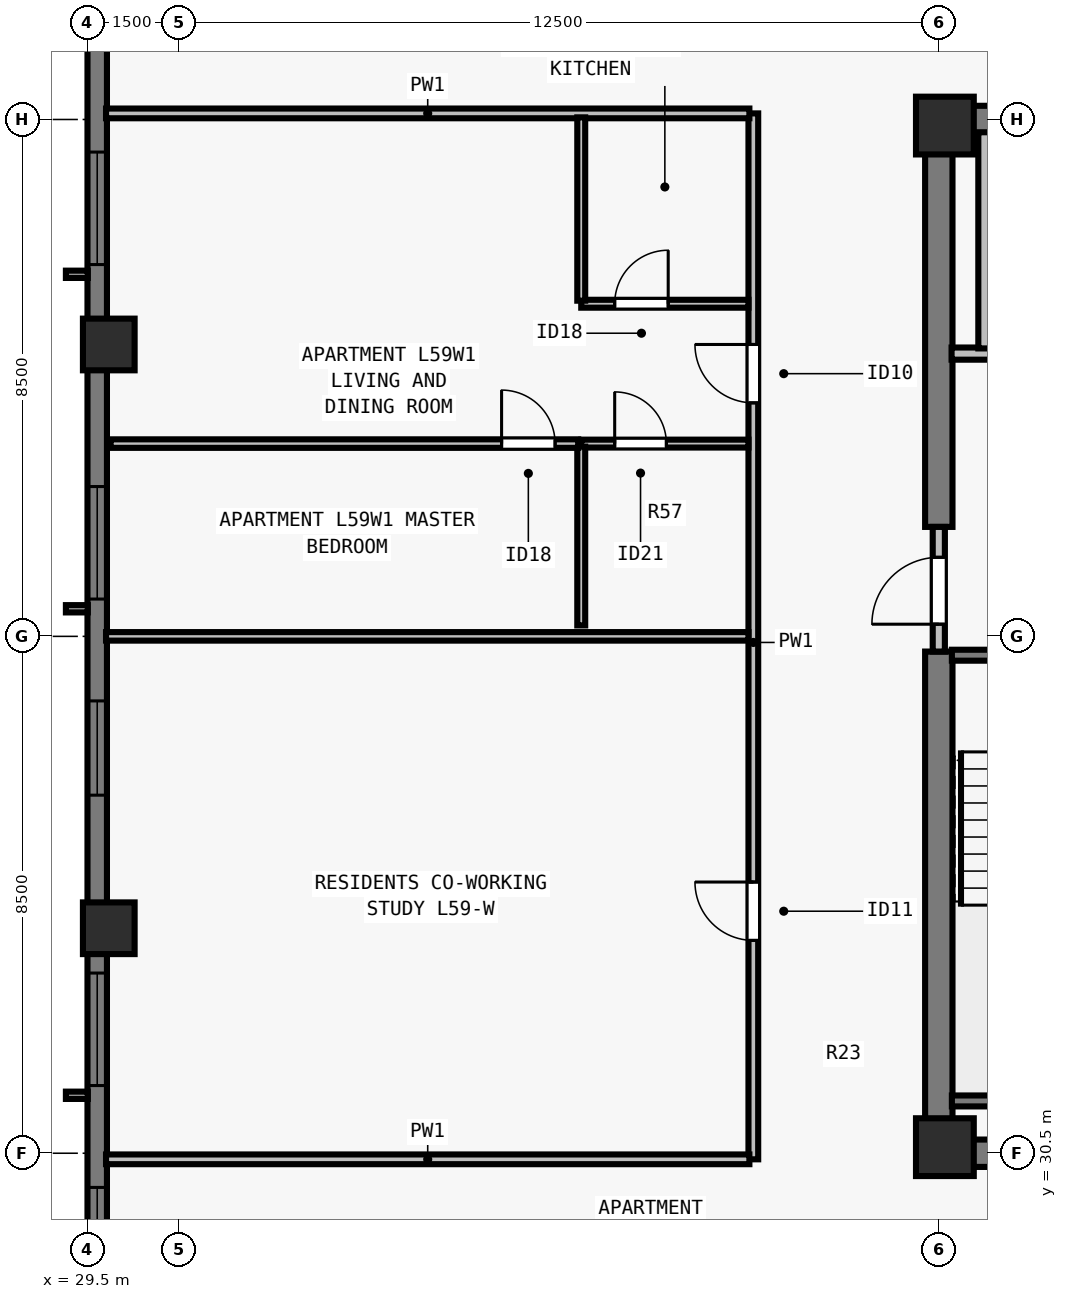
"""IFC4 building model, lengths in metres.
Left out: names, types, materials, properties, quantities, classifications, styles, units other than length and angle.
Written with IfcOpenShell. Run it as: python <this file> out.ifc"""

import sys

from ifc_helpers import new_model, si_unit, direction, frame, frame_2d, origin, origin_2d, place, context, subcontext, project, spatial, rectangle, extrude, element, fill, save


model = new_model("IFC4")
c1 = context("Model", 3, precision=1e-05, world=origin(), true_north=direction((0.0, 1.0)))
c2 = subcontext(c1, "Body", "Model", "MODEL_VIEW")
j1 = project(units=[si_unit("LENGTHUNIT", "METRE"), si_unit("PLANEANGLEUNIT", "RADIAN")], contexts=[c1])
p1 = place(None, origin())
s1 = spatial("IfcSite", under=j1, at=p1, CompositionType="ELEMENT")
p2 = place(p1, origin())
s2 = spatial("IfcBuilding", under=s1, at=p2, CompositionType="ELEMENT")
p3 = place(p2, frame((0.0, 0.0, 216.5)))
s3 = spatial("IfcBuildingStorey", under=s2, at=p3, CompositionType="ELEMENT", Elevation=216.5)
for number, where, z_axis, x_axis in (
    (1, (43.6, 30.6, 0.0), (0.0, 0.0, 1.0), (1.0, 0.0, 0.0)),
    (2, (43.6, 47.4, 0.0), (0.0, 0.0, 1.0), (1.0, 0.0, 0.0)),
):
    element("IfcColumn", number, at=place(p3, frame(where, z_axis=z_axis, x_axis=x_axis)), inside=s3, PredefinedType="COLUMN", context=c2, shape_type="SweptSolid", body=[
        extrude(rectangle(XDim=0.95, YDim=0.95, at=origin_2d()), origin(), (0.0, 0.0, 1.0), 3.5),
    ])
for number, where, z_axis, x_axis in (
    (3, (29.85, 43.8, 0.0), (0.0, 0.0, 1.0), (0.0, 1.0, 0.0)),
    (4, (29.85, 34.2, 0.0), (0.0, 0.0, 1.0), (0.0, 1.0, 0.0)),
):
    element("IfcColumn", number, at=place(p3, frame(where, z_axis=z_axis, x_axis=x_axis)), inside=s3, PredefinedType="COLUMN", context=c2, shape_type="SweptSolid", body=[
        extrude(rectangle(XDim=0.85, YDim=0.85, at=origin_2d()), origin(), (0.0, 0.0, 1.0), 3.5),
    ])
p4 = place(p3, frame((29.66, 21.5, 0.0), z_axis=(0.0, 0.0, 1.0), x_axis=(0.0, 1.0, 0.0)))
e5 = element("IfcWall", 5, at=p4, inside=s3, PredefinedType="SOLIDWALL", context=c2, shape_type="SweptSolid", body=[
    extrude(rectangle(XDim=34.702, YDim=0.32, at=frame_2d((17.351, 0.0))), origin(), (0.0, 0.0, 1.0), 3.29),
])
p5 = place(p4, frame((6.888, 0.0, 0.8)))
e6 = element("IfcOpeningElement", 6, at=p5, cuts=e5, PredefinedType="OPENING", context=c2, shape_type="SweptSolid", body=[
    extrude(rectangle(XDim=1.55, YDim=1.678, at=frame_2d((0.775, 0.839))), frame((0.0, 0.17, 0.0), z_axis=(0.0, -1.0, 0.0), x_axis=(1.0, 0.0, 0.0)), (0.0, 0.0, 1.0), 0.34),
])
p6 = place(p4, frame((10.113, 0.0, 0.8)))
e7 = element("IfcOpeningElement", 7, at=p6, cuts=e5, PredefinedType="OPENING", context=c2, shape_type="SweptSolid", body=[
    extrude(rectangle(XDim=1.85, YDim=1.678, at=frame_2d((0.925, 0.839))), frame((0.0, 0.17, 0.0), z_axis=(0.0, -1.0, 0.0), x_axis=(1.0, 0.0, 0.0)), (0.0, 0.0, 1.0), 0.34),
])
p7 = place(p4, frame((14.888, 0.0, 0.8)))
e8 = element("IfcOpeningElement", 8, at=p7, cuts=e5, PredefinedType="OPENING", context=c2, shape_type="SweptSolid", body=[
    extrude(rectangle(XDim=1.55, YDim=1.678, at=frame_2d((0.775, 0.839))), frame((0.0, 0.17, 0.0), z_axis=(0.0, -1.0, 0.0), x_axis=(1.0, 0.0, 0.0)), (0.0, 0.0, 1.0), 0.34),
])
p8 = place(p4, frame((18.114, 0.0, 0.8)))
e9 = element("IfcOpeningElement", 9, at=p8, cuts=e5, PredefinedType="OPENING", context=c2, shape_type="SweptSolid", body=[
    extrude(rectangle(XDim=1.85, YDim=1.678, at=frame_2d((0.925, 0.839))), frame((0.0, 0.17, 0.0), z_axis=(0.0, -1.0, 0.0), x_axis=(1.0, 0.0, 0.0)), (0.0, 0.0, 1.0), 0.34),
])
p9 = place(p4, frame((23.614, 0.0, 0.8)))
e10 = element("IfcOpeningElement", 10, at=p9, cuts=e5, PredefinedType="OPENING", context=c2, shape_type="SweptSolid", body=[
    extrude(rectangle(XDim=1.85, YDim=1.678, at=frame_2d((0.925, 0.839))), frame((0.0, 0.17, 0.0), z_axis=(0.0, -1.0, 0.0), x_axis=(1.0, 0.0, 0.0)), (0.0, 0.0, 1.0), 0.34),
])
p10 = place(p4, frame((29.24, 0.0, 0.8)))
e11 = element("IfcOpeningElement", 11, at=p10, cuts=e5, PredefinedType="OPENING", context=c2, shape_type="SweptSolid", body=[
    extrude(rectangle(XDim=1.55, YDim=1.678, at=frame_2d((0.775, 0.839))), frame((0.0, 0.17, 0.0), z_axis=(0.0, -1.0, 0.0), x_axis=(1.0, 0.0, 0.0)), (0.0, 0.0, 1.0), 0.34),
])
for number, where, z_axis, x_axis in (
    (12, (43.275, 30.5, 0.0), (0.0, 0.0, 1.0), (1.0, 0.0, 0.0)),
    (13, (43.275, 47.5, 0.0), (0.0, 0.0, 1.0), (1.0, 0.0, 0.0)),
):
    element("IfcWall", number, at=place(p3, frame(where, z_axis=z_axis, x_axis=x_axis)), inside=s3, PredefinedType="SHEAR", context=c2, shape_type="SweptSolid", body=[
        extrude(rectangle(XDim=17.45, YDim=0.45, at=frame_2d((8.725, 0.0))), origin(), (0.0, 0.0, 1.0), 3.29),
    ])
p11 = place(p3, frame((43.5, 30.715, 0.0), z_axis=(0.0, 0.0, 1.0), x_axis=(0.0, 1.0, 0.0)))
e14 = element("IfcWall", 14, at=p11, inside=s3, PredefinedType="SHEAR", context=c2, shape_type="SweptSolid", body=[
    extrude(rectangle(XDim=8.035, YDim=0.45, at=frame_2d((4.018, 0.0))), origin(), (0.0, 0.0, 1.0), 3.29),
])
p12 = place(p3, frame((43.5, 40.8, 0.0), z_axis=(0.0, 0.0, 1.0), x_axis=(0.0, 1.0, 0.0)))
e15 = element("IfcWall", 15, at=p12, inside=s3, PredefinedType="SHEAR", context=c2, shape_type="SweptSolid", body=[
    extrude(rectangle(XDim=6.485, YDim=0.45, at=frame_2d((3.242, 0.0))), origin(), (0.0, 0.0, 1.0), 3.29),
])
p13 = place(p3, frame((43.5, 38.75, 0.0), z_axis=(0.0, 0.0, 1.0), x_axis=(0.0, 1.0, 0.0)))
e16 = element("IfcWall", 16, at=p13, inside=s3, PredefinedType="SOLIDWALL", context=c2, shape_type="SweptSolid", body=[
    extrude(rectangle(XDim=2.05, YDim=0.2, at=frame_2d((1.025, 0.0))), origin(), (0.0, 0.0, 1.0), 3.29),
])
p14 = place(p13, frame((0.45, 0.0, 0.0)))
e17 = element("IfcOpeningElement", 17, at=p14, cuts=e16, PredefinedType="OPENING", context=c2, shape_type="SweptSolid", body=[
    extrude(rectangle(XDim=1.1, YDim=2.15, at=frame_2d((0.55, 1.075))), frame((0.0, 0.11, 0.0), z_axis=(0.0, -1.0, 0.0), x_axis=(1.0, 0.0, 0.0)), (0.0, 0.0, 1.0), 0.22),
])
p15 = place(p3, frame((43.71, 43.65, 0.0), z_axis=(0.0, 0.0, 1.0), x_axis=(1.0, 0.0, 0.0)))
e18 = element("IfcWall", 18, at=p15, inside=s3, PredefinedType="SOLIDWALL", context=c2, shape_type="SweptSolid", body=[
    extrude(rectangle(XDim=3.555, YDim=0.2, at=frame_2d((1.777, 0.0))), origin(), (0.0, 0.0, 1.0), 3.29),
])
p16 = place(p15, frame((1.16, 0.0, 0.0)))
e19 = element("IfcOpeningElement", 19, at=p16, cuts=e18, PredefinedType="OPENING", context=c2, shape_type="SweptSolid", body=[
    extrude(rectangle(XDim=1.1, YDim=2.2, at=frame_2d((0.55, 1.1))), frame((0.0, 0.11, 0.0), z_axis=(0.0, -1.0, 0.0), x_axis=(1.0, 0.0, 0.0)), (0.0, 0.0, 1.0), 0.22),
])
p17 = place(p3, frame((44.25, 43.735, 0.0), z_axis=(0.0, 0.0, 1.0), x_axis=(0.0, 1.0, 0.0)))
e20 = element("IfcWall", 20, at=p17, inside=s3, PredefinedType="SOLIDWALL", context=c2, shape_type="SweptSolid", body=[
    extrude(rectangle(XDim=3.555, YDim=0.2, at=frame_2d((1.777, 0.0))), origin(), (0.0, 0.0, 1.0), 3.29),
])
p18 = place(p3, frame((40.45, 30.4, 0.0), z_axis=(0.0, 0.0, 1.0), x_axis=(0.0, 1.0, 0.0)))
e21 = element("IfcWall", 21, at=p18, inside=s3, PredefinedType="PARTITIONING", context=c2, shape_type="SweptSolid", body=[
    extrude(rectangle(XDim=17.2, YDim=0.16, at=frame_2d((8.6, 0.0))), origin(), (0.0, 0.0, 1.0), 3.29),
])
p19 = place(p18, frame((3.6, 0.0, 0.0)))
e22 = element("IfcOpeningElement", 22, at=p19, cuts=e21, PredefinedType="OPENING", context=c2, shape_type="SweptSolid", body=[
    extrude(rectangle(XDim=0.96, YDim=2.12, at=frame_2d((0.48, 1.06))), frame((0.0, 0.09, 0.0), z_axis=(0.0, -1.0, 0.0), x_axis=(1.0, 0.0, 0.0)), (0.0, 0.0, 1.0), 0.18),
])
p20 = place(p18, frame((12.44, 0.0, 0.0)))
e23 = element("IfcOpeningElement", 23, at=p20, cuts=e21, PredefinedType="OPENING", context=c2, shape_type="SweptSolid", body=[
    extrude(rectangle(XDim=0.96, YDim=2.18, at=frame_2d((0.48, 1.09))), frame((0.0, 0.09, 0.0), z_axis=(0.0, -1.0, 0.0), x_axis=(1.0, 0.0, 0.0)), (0.0, 0.0, 1.0), 0.18),
])
for number, where, z_axis, x_axis in (
    (24, (29.805, 30.4, 0.0), (0.0, 0.0, 1.0), (1.0, 0.0, 0.0)),
    (25, (29.805, 47.6, 0.0), (0.0, 0.0, 1.0), (1.0, 0.0, 0.0)),
):
    element("IfcWall", number, at=place(p3, frame(where, z_axis=z_axis, x_axis=x_axis)), inside=s3, PredefinedType="PARTITIONING", context=c2, shape_type="SweptSolid", body=[
        extrude(rectangle(XDim=10.58, YDim=0.16, at=frame_2d((5.29, 0.0))), origin(), (0.0, 0.0, 1.0), 3.29),
    ])
p21 = place(p3, frame((29.805, 39.0, 0.0), z_axis=(0.0, 0.0, 1.0), x_axis=(1.0, 0.0, 0.0)))
e26 = element("IfcWall", 26, at=p21, inside=s3, PredefinedType="PARTITIONING", context=c2, shape_type="SweptSolid", body=[
    extrude(rectangle(XDim=10.565, YDim=0.14, at=frame_2d((5.283, 0.0))), origin(), (0.0, 0.0, 1.0), 2.958),
])
p22 = place(p3, frame((37.62, 42.17, 0.0), z_axis=(0.0, 0.0, 1.0), x_axis=(1.0, 0.0, 0.0)))
e27 = element("IfcWall", 27, at=p22, inside=s3, PredefinedType="PLUMBINGWALL", context=c2, shape_type="SweptSolid", body=[
    extrude(rectangle(XDim=2.75, YDim=0.13, at=frame_2d((1.375, 0.0))), origin(), (0.0, 0.0, 1.0), 2.958),
])
p23 = place(p22, frame((0.55, 0.0, 0.0)))
e28 = element("IfcOpeningElement", 28, at=p23, cuts=e27, PredefinedType="OPENING", context=c2, shape_type="SweptSolid", body=[
    extrude(rectangle(XDim=0.85, YDim=2.08, at=frame_2d((0.425, 1.04))), frame((0.0, 0.075, 0.0), z_axis=(0.0, -1.0, 0.0), x_axis=(1.0, 0.0, 0.0)), (0.0, 0.0, 1.0), 0.15),
])
p24 = place(p3, frame((37.62, 39.18, 0.0), z_axis=(0.0, 0.0, 1.0), x_axis=(0.0, 1.0, 0.0)))
e29 = element("IfcWall", 29, at=p24, inside=s3, PredefinedType="PLUMBINGWALL", context=c2, shape_type="SweptSolid", body=[
    extrude(rectangle(XDim=2.94, YDim=0.13, at=frame_2d((1.47, 0.0))), origin(), (0.0, 0.0, 1.0), 3.29),
])
p25 = place(p3, frame((37.62, 44.47, 0.0), z_axis=(0.0, 0.0, 1.0), x_axis=(1.0, 0.0, 0.0)))
e30 = element("IfcWall", 30, at=p25, inside=s3, PredefinedType="PLUMBINGWALL", context=c2, shape_type="SweptSolid", body=[
    extrude(rectangle(XDim=2.75, YDim=0.13, at=frame_2d((1.375, 0.0))), origin(), (0.0, 0.0, 1.0), 3.29),
])
p26 = place(p25, frame((0.55, 0.0, 0.0)))
e31 = element("IfcOpeningElement", 31, at=p26, cuts=e30, PredefinedType="OPENING", context=c2, shape_type="SweptSolid", body=[
    extrude(rectangle(XDim=0.88, YDim=2.1, at=frame_2d((0.44, 1.05))), frame((0.0, 0.075, 0.0), z_axis=(0.0, -1.0, 0.0), x_axis=(1.0, 0.0, 0.0)), (0.0, 0.0, 1.0), 0.15),
])
p27 = place(p3, frame((37.62, 44.52, 0.0), z_axis=(0.0, 0.0, 1.0), x_axis=(0.0, 1.0, 0.0)))
e32 = element("IfcWall", 32, at=p27, inside=s3, PredefinedType="PLUMBINGWALL", context=c2, shape_type="SweptSolid", body=[
    extrude(rectangle(XDim=3.015, YDim=0.13, at=frame_2d((1.507, 0.0))), origin(), (0.0, 0.0, 1.0), 3.29),
])
p28 = place(p3, frame((29.88, 42.17, 0.0), z_axis=(0.0, 0.0, 1.0), x_axis=(1.0, 0.0, 0.0)))
e33 = element("IfcWall", 33, at=p28, inside=s3, PredefinedType="PARTITIONING", context=c2, shape_type="SweptSolid", body=[
    extrude(rectangle(XDim=7.69, YDim=0.14, at=frame_2d((3.845, 0.0))), origin(), (0.0, 0.0, 1.0), 3.29),
])
p29 = place(p28, frame((6.43, 0.0, 0.0)))
e34 = element("IfcOpeningElement", 34, at=p29, cuts=e33, PredefinedType="OPENING", context=c2, shape_type="SweptSolid", body=[
    extrude(rectangle(XDim=0.88, YDim=2.1, at=frame_2d((0.44, 1.05))), frame((0.0, 0.08, 0.0), z_axis=(0.0, -1.0, 0.0), x_axis=(1.0, 0.0, 0.0)), (0.0, 0.0, 1.0), 0.16),
])
p30 = place(p3, frame((43.715, 38.69, 0.0), z_axis=(0.0, 0.0, 1.0), x_axis=(1.0, 0.0, 0.0)))
e35 = element("IfcWall", 35, at=p30, inside=s3, PredefinedType="SOLIDWALL", context=c2, shape_type="SweptSolid", body=[
    extrude(rectangle(XDim=3.28, YDim=0.18, at=frame_2d((1.64, 0.0))), origin(), (0.0, 0.0, 1.0), 3.29),
])
p31 = place(p30, frame((1.165, 0.0, 0.0)))
e36 = element("IfcOpeningElement", 36, at=p31, cuts=e35, PredefinedType="OPENING", context=c2, shape_type="SweptSolid", body=[
    extrude(rectangle(XDim=0.95, YDim=2.15, at=frame_2d((0.475, 1.075))), frame((0.0, 0.1, 0.0), z_axis=(0.0, -1.0, 0.0), x_axis=(1.0, 0.0, 0.0)), (0.0, 0.0, 1.0), 0.2),
])
p32 = place(p3, frame((43.715, 31.36, 0.0), z_axis=(0.0, 0.0, 1.0), x_axis=(1.0, 0.0, 0.0)))
e37 = element("IfcWall", 37, at=p32, inside=s3, PredefinedType="SOLIDWALL", context=c2, shape_type="SweptSolid", body=[
    extrude(rectangle(XDim=3.28, YDim=0.18, at=frame_2d((1.64, 0.0))), origin(), (0.0, 0.0, 1.0), 3.29),
])
p33 = place(p5, origin())
e38 = element("IfcWindow", 38, at=p33, inside=s3, PartitioningType="SINGLE_PANEL", PredefinedType="WINDOW", context=c2, shape_type="SweptSolid", body=[
    extrude(rectangle(XDim=1.55, YDim=1.678, at=frame_2d((0.775, 0.839))), frame((0.0, -0.05, 0.0), z_axis=(0.0, -1.0, 0.0), x_axis=(1.0, 0.0, 0.0)), (0.0, 0.0, 1.0), 0.06),
])
fill(e6, e38)
p34 = place(p6, origin())
e39 = element("IfcWindow", 39, at=p34, inside=s3, PartitioningType="SINGLE_PANEL", PredefinedType="WINDOW", context=c2, shape_type="SweptSolid", body=[
    extrude(rectangle(XDim=1.85, YDim=1.678, at=frame_2d((0.925, 0.839))), frame((0.0, -0.05, 0.0), z_axis=(0.0, -1.0, 0.0), x_axis=(1.0, 0.0, 0.0)), (0.0, 0.0, 1.0), 0.06),
])
fill(e7, e39)
p35 = place(p7, origin())
e40 = element("IfcWindow", 40, at=p35, inside=s3, PartitioningType="SINGLE_PANEL", PredefinedType="WINDOW", context=c2, shape_type="SweptSolid", body=[
    extrude(rectangle(XDim=1.55, YDim=1.678, at=frame_2d((0.775, 0.839))), frame((0.0, -0.05, 0.0), z_axis=(0.0, -1.0, 0.0), x_axis=(1.0, 0.0, 0.0)), (0.0, 0.0, 1.0), 0.06),
])
fill(e8, e40)
p36 = place(p8, origin())
e41 = element("IfcWindow", 41, at=p36, inside=s3, PartitioningType="SINGLE_PANEL", PredefinedType="WINDOW", context=c2, shape_type="SweptSolid", body=[
    extrude(rectangle(XDim=1.85, YDim=1.678, at=frame_2d((0.925, 0.839))), frame((0.0, -0.05, 0.0), z_axis=(0.0, -1.0, 0.0), x_axis=(1.0, 0.0, 0.0)), (0.0, 0.0, 1.0), 0.06),
])
fill(e9, e41)
p37 = place(p9, origin())
e42 = element("IfcWindow", 42, at=p37, inside=s3, PartitioningType="SINGLE_PANEL", PredefinedType="WINDOW", context=c2, shape_type="SweptSolid", body=[
    extrude(rectangle(XDim=1.85, YDim=1.678, at=frame_2d((0.925, 0.839))), frame((0.0, -0.05, 0.0), z_axis=(0.0, -1.0, 0.0), x_axis=(1.0, 0.0, 0.0)), (0.0, 0.0, 1.0), 0.06),
])
fill(e10, e42)
p38 = place(p14, origin())
e43 = element("IfcDoor", 43, at=p38, inside=s3, OperationType="SINGLE_SWING_LEFT", PredefinedType="DOOR", context=c2, shape_type="SweptSolid", body=[
    extrude(rectangle(XDim=1.1, YDim=2.15, at=frame_2d((0.55, 1.075))), frame((0.0, 0.025, 0.0), z_axis=(0.0, -1.0, 0.0), x_axis=(1.0, 0.0, 0.0)), (0.0, 0.0, 1.0), 0.05),
])
fill(e17, e43)
p39 = place(p19, origin())
e44 = element("IfcDoor", 44, at=p39, inside=s3, OperationType="SINGLE_SWING_RIGHT", PredefinedType="DOOR", context=c2, shape_type="SweptSolid", body=[
    extrude(rectangle(XDim=0.96, YDim=2.12, at=frame_2d((0.48, 1.06))), frame((0.0, 0.025, 0.0), z_axis=(0.0, -1.0, 0.0), x_axis=(1.0, 0.0, 0.0)), (0.0, 0.0, 1.0), 0.05),
])
fill(e22, e44)
p40 = place(p23, origin())
e45 = element("IfcDoor", 45, at=p40, inside=s3, OperationType="SINGLE_SWING_LEFT", PredefinedType="DOOR", context=c2, shape_type="SweptSolid", body=[
    extrude(rectangle(XDim=0.85, YDim=2.08, at=frame_2d((0.425, 1.04))), frame((0.0, 0.025, 0.0), z_axis=(0.0, -1.0, 0.0), x_axis=(1.0, 0.0, 0.0)), (0.0, 0.0, 1.0), 0.05),
])
fill(e28, e45)
p41 = place(p26, origin())
e46 = element("IfcDoor", 46, at=p41, inside=s3, OperationType="SINGLE_SWING_RIGHT", PredefinedType="DOOR", context=c2, shape_type="SweptSolid", body=[
    extrude(rectangle(XDim=0.88, YDim=2.1, at=frame_2d((0.44, 1.05))), frame((0.0, 0.025, 0.0), z_axis=(0.0, -1.0, 0.0), x_axis=(1.0, 0.0, 0.0)), (0.0, 0.0, 1.0), 0.05),
])
fill(e31, e46)
p42 = place(p29, origin())
e47 = element("IfcDoor", 47, at=p42, inside=s3, OperationType="SINGLE_SWING_LEFT", PredefinedType="DOOR", context=c2, shape_type="SweptSolid", body=[
    extrude(rectangle(XDim=0.88, YDim=2.1, at=frame_2d((0.44, 1.05))), frame((0.0, 0.025, 0.0), z_axis=(0.0, -1.0, 0.0), x_axis=(1.0, 0.0, 0.0)), (0.0, 0.0, 1.0), 0.05),
])
fill(e34, e47)
p43 = place(p20, origin())
e48 = element("IfcDoor", 48, at=p43, inside=s3, OperationType="SINGLE_SWING_RIGHT", PredefinedType="DOOR", context=c2, shape_type="SweptSolid", body=[
    extrude(rectangle(XDim=0.96, YDim=2.18, at=frame_2d((0.48, 1.09))), frame((0.0, 0.025, 0.0), z_axis=(0.0, -1.0, 0.0), x_axis=(1.0, 0.0, 0.0)), (0.0, 0.0, 1.0), 0.05),
])
fill(e23, e48)
save(model, sys.argv[1])
